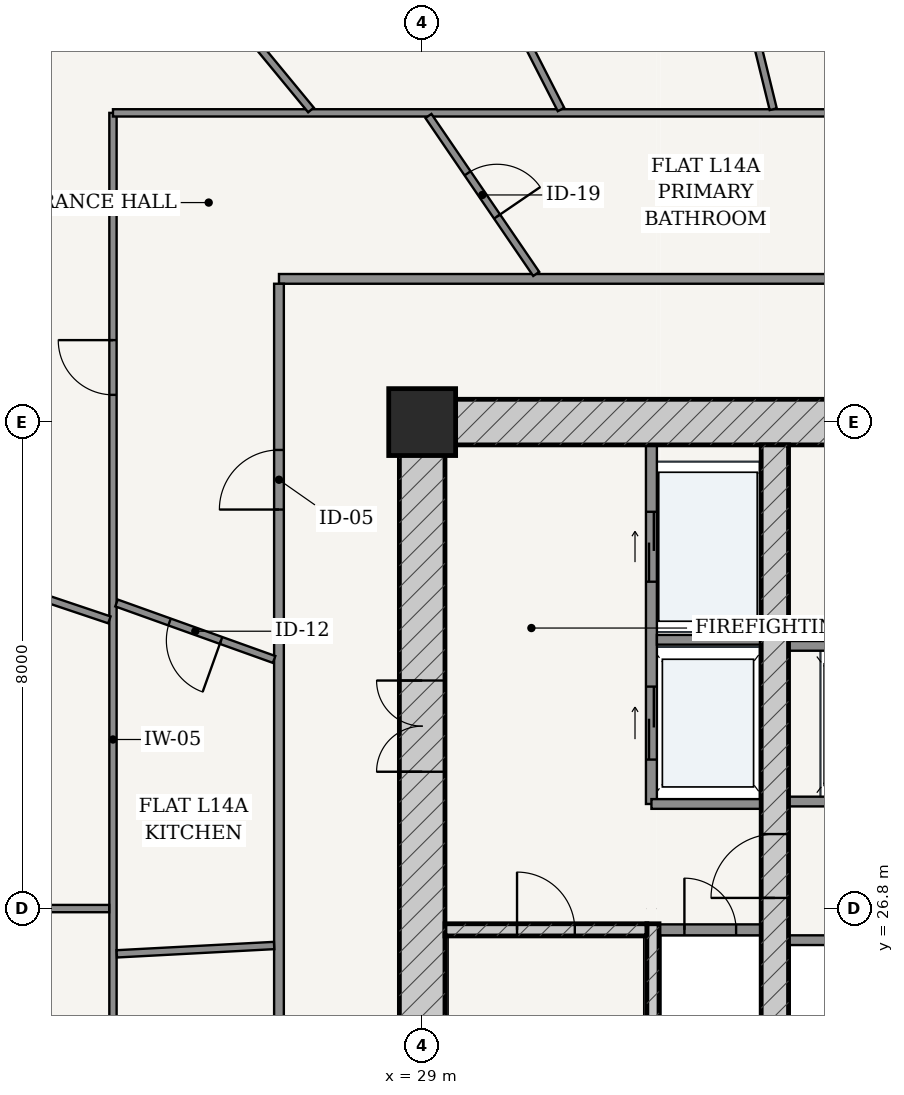
"""IFC4 building model, lengths in metres.
Left out: names, types, materials, properties, quantities, classifications, styles, units other than length and angle.
Written with IfcOpenShell. Run it as: python <this file> out.ifc"""

import sys

from ifc_helpers import new_model, si_unit, direction, frame, frame_2d, origin, origin_2d, place, context, subcontext, project, spatial, rectangle, extrude, source, transform, mapped, element, fill, save


model = new_model("IFC4")
c1 = context("Model", 3, precision=1e-05, world=origin(), true_north=direction((-0.2419218956, 0.970295726276)))
c2 = subcontext(c1, "Body", "Model", "MODEL_VIEW")
j1 = project(units=[si_unit("LENGTHUNIT", "METRE"), si_unit("PLANEANGLEUNIT", "RADIAN")], contexts=[c1])
p1 = place(None, origin())
s1 = spatial("IfcSite", under=j1, at=p1, CompositionType="ELEMENT")
p2 = place(p1, origin())
s2 = spatial("IfcBuilding", under=s1, at=p2, CompositionType="ELEMENT")
p3 = place(p2, frame((0.0, 0.0, 56.4)))
s3 = spatial("IfcBuildingStorey", under=s2, at=p3, CompositionType="ELEMENT", Elevation=56.4)
p4 = place(p3, frame((29.0, 34.8, 0.0), z_axis=(0.0, 0.0, 1.0), x_axis=(1.0, 0.0, 0.0)))
e1 = element("IfcColumn", 1, at=p4, inside=s3, PredefinedType="COLUMN", context=c2, shape_type="SweptSolid", body=[
    extrude(rectangle(XDim=1.1, YDim=1.1, at=origin_2d()), origin(), (0.0, 0.0, 1.0), 3.6),
])
p5 = place(p3, frame((28.625, 34.8, 0.0), z_axis=(0.0, 0.0, 1.0), x_axis=(1.0, 0.0, 0.0)))
e2 = element("IfcWall", 2, at=p5, inside=s3, PredefinedType="SHEAR", context=c2, shape_type="SweptSolid", body=[
    extrude(rectangle(XDim=18.75, YDim=0.75, at=frame_2d((9.375, 0.0))), origin(), (0.0, 0.0, 1.0), 3.32),
])
p6 = place(p5, frame((8.95, 0.0, 0.0)))
e3 = element("IfcOpeningElement", 3, at=p6, cuts=e2, PredefinedType="OPENING", context=c2, shape_type="SweptSolid", body=[
    extrude(rectangle(XDim=0.85, YDim=2.1, at=frame_2d((0.425, 1.05))), frame((0.0, 0.385, 0.0), z_axis=(0.0, -1.0, 0.0), x_axis=(1.0, 0.0, 0.0)), (0.0, 0.0, 1.0), 0.77),
])
p7 = place(p3, frame((29.0, 19.175, 0.0), z_axis=(0.0, 0.0, 1.0), x_axis=(0.0, 1.0, 0.0)))
e4 = element("IfcWall", 4, at=p7, inside=s3, PredefinedType="SHEAR", context=c2, shape_type="SweptSolid", body=[
    extrude(rectangle(XDim=15.25, YDim=0.75, at=frame_2d((7.625, 0.0))), origin(), (0.0, 0.0, 1.0), 3.32),
])
p8 = place(p7, frame((9.875, 0.0, 0.0)))
e5 = element("IfcOpeningElement", 5, at=p8, cuts=e4, PredefinedType="OPENING", context=c2, shape_type="SweptSolid", body=[
    extrude(rectangle(XDim=1.5, YDim=2.2, at=frame_2d((0.75, 1.1))), frame((0.0, 0.385, 0.0), z_axis=(0.0, -1.0, 0.0), x_axis=(1.0, 0.0, 0.0)), (0.0, 0.0, 1.0), 0.77),
])
p9 = place(p3, frame((32.795, 19.175, 0.0), z_axis=(0.0, 0.0, 1.0), x_axis=(0.0, 1.0, 0.0)))
e6 = element("IfcWall", 6, at=p9, inside=s3, PredefinedType="SOLIDWALL", context=c2, shape_type="SweptSolid", body=[
    extrude(rectangle(XDim=7.375, YDim=0.2, at=frame_2d((3.688, 0.0))), origin(), (0.0, 0.0, 1.0), 3.32),
])
p10 = place(p3, frame((29.375, 26.45, 0.0), z_axis=(0.0, 0.0, 1.0), x_axis=(1.0, 0.0, 0.0)))
e7 = element("IfcWall", 7, at=p10, inside=s3, PredefinedType="SOLIDWALL", context=c2, shape_type="SweptSolid", body=[
    extrude(rectangle(XDim=3.32, YDim=0.2, at=frame_2d((1.66, 0.0))), origin(), (0.0, 0.0, 1.0), 3.32),
])
p11 = place(p10, frame((1.185, 0.0, 0.0)))
e8 = element("IfcOpeningElement", 8, at=p11, cuts=e7, PredefinedType="OPENING", context=c2, shape_type="SweptSolid", body=[
    extrude(rectangle(XDim=0.95, YDim=2.15, at=frame_2d((0.475, 1.075))), frame((0.0, 0.11, 0.0), z_axis=(0.0, -1.0, 0.0), x_axis=(1.0, 0.0, 0.0)), (0.0, 0.0, 1.0), 0.22),
])
p12 = place(p3, frame((34.8, 19.175, 0.0), z_axis=(0.0, 0.0, 1.0), x_axis=(0.0, 1.0, 0.0)))
e9 = element("IfcWall", 9, at=p12, inside=s3, PredefinedType="SHEAR", context=c2, shape_type="SweptSolid", body=[
    extrude(rectangle(XDim=15.25, YDim=0.45, at=frame_2d((7.625, 0.0))), origin(), (0.0, 0.0, 1.0), 3.32),
])
p13 = place(p12, frame((7.8, 0.0, 0.0)))
e10 = element("IfcOpeningElement", 10, at=p13, cuts=e9, PredefinedType="OPENING", context=c2, shape_type="SweptSolid", body=[
    extrude(rectangle(XDim=1.05, YDim=2.15, at=frame_2d((0.525, 1.075))), frame((0.0, 0.235, 0.0), z_axis=(0.0, -1.0, 0.0), x_axis=(1.0, 0.0, 0.0)), (0.0, 0.0, 1.0), 0.47),
])
p14 = place(p3, frame((32.9, 26.45, 0.0), z_axis=(0.0, 0.0, 1.0), x_axis=(1.0, 0.0, 0.0)))
e11 = element("IfcWall", 11, at=p14, inside=s3, PredefinedType="PARTITIONING", context=c2, shape_type="SweptSolid", body=[
    extrude(rectangle(XDim=1.675, YDim=0.18, at=frame_2d((0.837, 0.0))), origin(), (0.0, 0.0, 1.0), 3.32),
])
p15 = place(p14, frame((0.413, 0.0, 0.0)))
e12 = element("IfcOpeningElement", 12, at=p15, cuts=e11, PredefinedType="OPENING", context=c2, shape_type="SweptSolid", body=[
    extrude(rectangle(XDim=0.85, YDim=2.1, at=frame_2d((0.425, 1.05))), frame((0.0, 0.1, 0.0), z_axis=(0.0, -1.0, 0.0), x_axis=(1.0, 0.0, 0.0)), (0.0, 0.0, 1.0), 0.2),
])
p16 = place(p3, frame((32.77, 28.52, 0.0), z_axis=(0.0, 0.0, 1.0), x_axis=(0.0, 1.0, 0.0)))
e13 = element("IfcWall", 13, at=p16, inside=s3, PredefinedType="PARTITIONING", context=c2, shape_type="SweptSolid", body=[
    extrude(rectangle(XDim=5.905, YDim=0.18, at=frame_2d((2.953, 0.0))), origin(), (0.0, 0.0, 1.0), 3.32),
])
p17 = place(p16, frame((3.655, 0.0, 0.0)))
e14 = element("IfcOpeningElement", 14, at=p17, cuts=e13, PredefinedType="OPENING", context=c2, shape_type="SweptSolid", body=[
    extrude(rectangle(XDim=1.15, YDim=2.2, at=frame_2d((0.575, 1.1))), frame((0.0, 0.1, 0.0), z_axis=(0.0, -1.0, 0.0), x_axis=(1.0, 0.0, 0.0)), (0.0, 0.0, 1.0), 0.2),
])
p18 = place(p16, frame((0.73, 0.0, 0.0)))
e15 = element("IfcOpeningElement", 15, at=p18, cuts=e13, PredefinedType="OPENING", context=c2, shape_type="SweptSolid", body=[
    extrude(rectangle(XDim=1.2, YDim=2.25, at=frame_2d((0.6, 1.125))), frame((0.0, 0.1, 0.0), z_axis=(0.0, -1.0, 0.0), x_axis=(1.0, 0.0, 0.0)), (0.0, 0.0, 1.0), 0.2),
])
p19 = place(p3, frame((32.86, 31.22, 0.0), z_axis=(0.0, 0.0, 1.0), x_axis=(1.0, 0.0, 0.0)))
e16 = element("IfcWall", 16, at=p19, inside=s3, PredefinedType="PARTITIONING", context=c2, shape_type="SweptSolid", body=[
    extrude(rectangle(XDim=1.715, YDim=0.16, at=frame_2d((0.857, 0.0))), origin(), (0.0, 0.0, 1.0), 3.32),
])
p20 = place(p3, frame((32.77, 28.52, 0.0), z_axis=(0.0, 0.0, 1.0), x_axis=(1.0, 0.0, 0.0)))
e17 = element("IfcWall", 17, at=p20, inside=s3, PredefinedType="PARTITIONING", context=c2, shape_type="SweptSolid", body=[
    extrude(rectangle(XDim=1.805, YDim=0.16, at=frame_2d((0.902, 0.0))), origin(), (0.0, 0.0, 1.0), 3.32),
])
p21 = place(p3, frame((35.025, 28.56, 0.0), z_axis=(0.0, 0.0, 1.0), x_axis=(1.0, 0.0, 0.0)))
e18 = element("IfcWall", 18, at=p21, inside=s3, PredefinedType="PARTITIONING", context=c2, shape_type="SweptSolid", body=[
    extrude(rectangle(XDim=5.95, YDim=0.16, at=frame_2d((2.975, 0.0))), origin(), (0.0, 0.0, 1.0), 3.32),
])
p22 = place(p21, frame((0.76, 0.0, 0.0)))
e19 = element("IfcOpeningElement", 19, at=p22, cuts=e18, PredefinedType="OPENING", context=c2, shape_type="SweptSolid", body=[
    extrude(rectangle(XDim=1.1, YDim=2.2, at=frame_2d((0.55, 1.1))), frame((0.0, 0.09, 0.0), z_axis=(0.0, -1.0, 0.0), x_axis=(1.0, 0.0, 0.0)), (0.0, 0.0, 1.0), 0.18),
])
p23 = place(p21, frame((2.425, 0.0, 0.0)))
e20 = element("IfcOpeningElement", 20, at=p23, cuts=e18, PredefinedType="OPENING", context=c2, shape_type="SweptSolid", body=[
    extrude(rectangle(XDim=1.1, YDim=2.2, at=frame_2d((0.55, 1.1))), frame((0.0, 0.09, 0.0), z_axis=(0.0, -1.0, 0.0), x_axis=(1.0, 0.0, 0.0)), (0.0, 0.0, 1.0), 0.18),
])
p24 = place(p21, frame((4.09, 0.0, 0.0)))
e21 = element("IfcOpeningElement", 21, at=p24, cuts=e18, PredefinedType="OPENING", context=c2, shape_type="SweptSolid", body=[
    extrude(rectangle(XDim=1.1, YDim=2.2, at=frame_2d((0.55, 1.1))), frame((0.0, 0.09, 0.0), z_axis=(0.0, -1.0, 0.0), x_axis=(1.0, 0.0, 0.0)), (0.0, 0.0, 1.0), 0.18),
])
for number, where, z_axis, x_axis in (
    (22, (35.025, 31.12, 0.0), (0.0, 0.0, 1.0), (1.0, 0.0, 0.0)),
    (23, (35.025, 26.28, 0.0), (0.0, 0.0, 1.0), (1.0, 0.0, 0.0)),
):
    element("IfcWall", number, at=place(p3, frame(where, z_axis=z_axis, x_axis=x_axis)), inside=s3, PredefinedType="PARTITIONING", context=c2, shape_type="SweptSolid", body=[
        extrude(rectangle(XDim=5.95, YDim=0.16, at=frame_2d((2.975, 0.0))), origin(), (0.0, 0.0, 1.0), 3.32),
    ])
p25 = place(p3, frame((26.645, 37.155, 0.0), z_axis=(0.0, 0.0, 1.0), x_axis=(1.0, 0.0, 0.0)))
e24 = element("IfcWall", 24, at=p25, inside=s3, PredefinedType="PARTITIONING", context=c2, shape_type="SweptSolid", body=[
    extrude(rectangle(XDim=22.71, YDim=0.16, at=frame_2d((11.355, 0.0))), origin(), (0.0, 0.0, 1.0), 2.688),
])
p26 = place(p3, frame((26.645, 16.525, 0.0), z_axis=(0.0, 0.0, 1.0), x_axis=(0.0, 1.0, 0.0)))
e25 = element("IfcWall", 25, at=p26, inside=s3, PredefinedType="PARTITIONING", context=c2, shape_type="SweptSolid", body=[
    extrude(rectangle(XDim=20.55, YDim=0.16, at=frame_2d((10.275, 0.0))), origin(), (0.0, 0.0, 1.0), 2.688),
])
p27 = place(p26, frame((16.837, 0.0, 0.0)))
e26 = element("IfcOpeningElement", 26, at=p27, cuts=e25, PredefinedType="OPENING", context=c2, shape_type="SweptSolid", body=[
    extrude(rectangle(XDim=0.98, YDim=2.2, at=frame_2d((0.49, 1.1))), frame((0.0, 0.09, 0.0), z_axis=(0.0, -1.0, 0.0), x_axis=(1.0, 0.0, 0.0)), (0.0, 0.0, 1.0), 0.18),
])
p28 = place(p3, frame((23.915, 19.276, 0.0), z_axis=(0.0, 0.0, 1.0), x_axis=(0.0, 1.0, 0.0)))
e27 = element("IfcWall", 27, at=p28, inside=s3, PredefinedType="PARTITIONING", context=c2, shape_type="SweptSolid", body=[
    extrude(rectangle(XDim=20.609, YDim=0.12, at=frame_2d((10.305, 0.0))), origin(), (0.0, 0.0, 1.0), 2.688),
])
p29 = place(p28, frame((15.972, 0.0, 0.0)))
e28 = element("IfcOpeningElement", 28, at=p29, cuts=e27, PredefinedType="OPENING", context=c2, shape_type="SweptSolid", body=[
    extrude(rectangle(XDim=0.9, YDim=2.15, at=frame_2d((0.45, 1.075))), frame((0.0, 0.07, 0.0), z_axis=(0.0, -1.0, 0.0), x_axis=(1.0, 0.0, 0.0)), (0.0, 0.0, 1.0), 0.14),
])
p30 = place(p28, frame((3.058, 0.0, 0.0)))
e29 = element("IfcOpeningElement", 29, at=p30, cuts=e27, PredefinedType="OPENING", context=c2, shape_type="SweptSolid", body=[
    extrude(rectangle(XDim=0.9, YDim=2.15, at=frame_2d((0.45, 1.075))), frame((0.0, 0.07, 0.0), z_axis=(0.0, -1.0, 0.0), x_axis=(1.0, 0.0, 0.0)), (0.0, 0.0, 1.0), 0.14),
])
p31 = place(p3, frame((23.915, 39.885, 0.0), z_axis=(0.0, 0.0, 1.0), x_axis=(1.0, 0.0, 0.0)))
e30 = element("IfcWall", 30, at=p31, inside=s3, PredefinedType="PARTITIONING", context=c2, shape_type="SweptSolid", body=[
    extrude(rectangle(XDim=28.17, YDim=0.12, at=frame_2d((14.085, 0.0))), origin(), (0.0, 0.0, 1.0), 2.688),
])
p32 = place(p31, frame((12.891, 0.0, 0.0)))
e31 = element("IfcOpeningElement", 31, at=p32, cuts=e30, PredefinedType="OPENING", context=c2, shape_type="SweptSolid", body=[
    extrude(rectangle(XDim=0.9, YDim=2.15, at=frame_2d((0.45, 1.075))), frame((0.0, 0.07, 0.0), z_axis=(0.0, -1.0, 0.0), x_axis=(1.0, 0.0, 0.0)), (0.0, 0.0, 1.0), 0.14),
])
p33 = place(p3, frame((34.773, 39.945, 0.0), z_axis=(0.0, 0.0, 1.0), x_axis=(-0.238375747469, 0.97117300365, 0.0)))
e32 = element("IfcWall", 32, at=p33, inside=s3, PredefinedType="PARTITIONING", context=c2, shape_type="SweptSolid", body=[
    extrude(rectangle(XDim=10.086, YDim=0.12, at=frame_2d((5.043, 0.0))), origin(), (0.0, 0.0, 1.0), 2.688),
])
p34 = place(p33, frame((3.519, 0.0, 0.0)))
e33 = element("IfcOpeningElement", 33, at=p34, cuts=e32, PredefinedType="OPENING", context=c2, shape_type="SweptSolid", body=[
    extrude(rectangle(XDim=0.9, YDim=2.15, at=frame_2d((0.45, 1.075))), frame((0.0, 0.07, 0.0), z_axis=(0.0, -1.0, 0.0), x_axis=(1.0, 0.0, 0.0)), (0.0, 0.0, 1.0), 0.14),
])
p35 = place(p3, frame((31.283, 39.94, 0.0), z_axis=(0.0, 0.0, 1.0), x_axis=(-0.455131303234, 0.890424335256, 0.0)))
e34 = element("IfcWall", 34, at=p35, inside=s3, PredefinedType="PARTITIONING", context=c2, shape_type="SweptSolid", body=[
    extrude(rectangle(XDim=9.562, YDim=0.12, at=frame_2d((4.781, 0.0))), origin(), (0.0, 0.0, 1.0), 2.762),
])
p36 = place(p35, frame((4.331, 0.0, 0.0)))
e35 = element("IfcOpeningElement", 35, at=p36, cuts=e34, PredefinedType="OPENING", context=c2, shape_type="SweptSolid", body=[
    extrude(rectangle(XDim=0.9, YDim=2.15, at=frame_2d((0.45, 1.075))), frame((0.0, 0.07, 0.0), z_axis=(0.0, -1.0, 0.0), x_axis=(1.0, 0.0, 0.0)), (0.0, 0.0, 1.0), 0.14),
])
p37 = place(p3, frame((27.171, 39.933, 0.0), z_axis=(0.0, 0.0, 1.0), x_axis=(-0.636192172227, 0.771530634516, 0.0)))
e36 = element("IfcWall", 36, at=p37, inside=s3, PredefinedType="PARTITIONING", context=c2, shape_type="SweptSolid", body=[
    extrude(rectangle(XDim=8.186, YDim=0.12, at=frame_2d((4.093, 0.0))), origin(), (0.0, 0.0, 1.0), 2.688),
])
p38 = place(p37, frame((2.584, 0.0, 0.0)))
e37 = element("IfcOpeningElement", 37, at=p38, cuts=e36, PredefinedType="OPENING", context=c2, shape_type="SweptSolid", body=[
    extrude(rectangle(XDim=0.9, YDim=2.15, at=frame_2d((0.45, 1.075))), frame((0.0, 0.07, 0.0), z_axis=(0.0, -1.0, 0.0), x_axis=(1.0, 0.0, 0.0)), (0.0, 0.0, 1.0), 0.14),
])
p39 = place(p3, frame((23.856, 31.547, 0.0), z_axis=(0.0, 0.0, 1.0), x_axis=(-0.948017487737, 0.318218231634, 0.0)))
e38 = element("IfcWall", 38, at=p39, inside=s3, PredefinedType="PARTITIONING", context=c2, shape_type="SweptSolid", body=[
    extrude(rectangle(XDim=13.279, YDim=0.12, at=frame_2d((6.639, 0.0))), origin(), (0.0, 0.0, 1.0), 2.762),
])
p40 = place(p39, frame((6.189, 0.0, 0.0)))
e39 = element("IfcOpeningElement", 39, at=p40, cuts=e38, PredefinedType="OPENING", context=c2, shape_type="SweptSolid", body=[
    extrude(rectangle(XDim=0.9, YDim=2.15, at=frame_2d((0.45, 1.075))), frame((0.0, 0.07, 0.0), z_axis=(0.0, -1.0, 0.0), x_axis=(1.0, 0.0, 0.0)), (0.0, 0.0, 1.0), 0.14),
])
p41 = place(p3, frame((23.853, 26.8, 0.0), z_axis=(0.0, 0.0, 1.0), x_axis=(-1.0, 0.0, 0.0)))
e40 = element("IfcWall", 40, at=p41, inside=s3, PredefinedType="PARTITIONING", context=c2, shape_type="SweptSolid", body=[
    extrude(rectangle(XDim=14.793, YDim=0.12, at=frame_2d((7.396, 0.0))), origin(), (0.0, 0.0, 1.0), 2.762),
])
p42 = place(p41, frame((6.947, 0.0, 0.0)))
e41 = element("IfcOpeningElement", 41, at=p42, cuts=e40, PredefinedType="OPENING", context=c2, shape_type="SweptSolid", body=[
    extrude(rectangle(XDim=0.9, YDim=2.15, at=frame_2d((0.45, 1.075))), frame((0.0, 0.07, 0.0), z_axis=(0.0, -1.0, 0.0), x_axis=(1.0, 0.0, 0.0)), (0.0, 0.0, 1.0), 0.14),
])
p43 = place(p3, frame((30.875, 37.237, 0.0), z_axis=(0.0, 0.0, 1.0), x_axis=(-0.563751131022, 0.825944708967, 0.0)))
e42 = element("IfcWall", 42, at=p43, inside=s3, PredefinedType="PARTITIONING", context=c2, shape_type="SweptSolid", body=[
    extrude(rectangle(XDim=3.145, YDim=0.12, at=frame_2d((1.572, 0.0))), origin(), (0.0, 0.0, 1.0), 3.32),
])
p44 = place(p43, frame((1.142, 0.0, 0.0)))
e43 = element("IfcOpeningElement", 43, at=p44, cuts=e42, PredefinedType="OPENING", context=c2, shape_type="SweptSolid", body=[
    extrude(rectangle(XDim=0.86, YDim=2.15, at=frame_2d((0.43, 1.075))), frame((0.0, 0.07, 0.0), z_axis=(0.0, -1.0, 0.0), x_axis=(1.0, 0.0, 0.0)), (0.0, 0.0, 1.0), 0.14),
])
p45 = place(p3, frame((26.565, 30.896, 0.0), z_axis=(0.0, 0.0, 1.0), x_axis=(-0.941406362049, 0.337274460186, 0.0)))
e44 = element("IfcWall", 44, at=p45, inside=s3, PredefinedType="PARTITIONING", context=c2, shape_type="SweptSolid", body=[
    extrude(rectangle(XDim=2.753, YDim=0.12, at=frame_2d((1.376, 0.0))), origin(), (0.0, 0.0, 1.0), 3.32),
])
p46 = place(p45, frame((0.927, 0.0, 0.0)))
e45 = element("IfcOpeningElement", 45, at=p46, cuts=e44, PredefinedType="OPENING", context=c2, shape_type="SweptSolid", body=[
    extrude(rectangle(XDim=0.9, YDim=2.15, at=frame_2d((0.45, 1.075))), frame((0.0, 0.07, 0.0), z_axis=(0.0, -1.0, 0.0), x_axis=(1.0, 0.0, 0.0)), (0.0, 0.0, 1.0), 0.14),
])
p47 = place(p3, frame((26.565, 26.193, 0.0), z_axis=(0.0, 0.0, 1.0), x_axis=(-0.99859273586, -0.053033460078, 0.0)))
e46 = element("IfcWall", 46, at=p47, inside=s3, PredefinedType="PARTITIONING", context=c2, shape_type="SweptSolid", body=[
    extrude(rectangle(XDim=2.592, YDim=0.12, at=frame_2d((1.296, 0.0))), origin(), (0.0, 0.0, 1.0), 3.32),
])
m1 = source(origin(), c2, "Body", "SweptSolid", [
    extrude(rectangle(XDim=1.5, YDim=2.2, at=frame_2d((0.75, 1.1))), frame((0.0, 0.025, 0.0), z_axis=(0.0, -1.0, 0.0), x_axis=(1.0, 0.0, 0.0)), (0.0, 0.0, 1.0), 0.05),
])
p48 = place(p8, origin())
e47 = element("IfcDoor", 47, at=p48, inside=s3, OperationType="DOUBLE_DOOR_SINGLE_SWING", PredefinedType="DOOR", context=c2, shape_type="MappedRepresentation", body=[
    mapped(m1, transform((0.0, 0.0, 0.0), scale=1.0)),
])
fill(e5, e47)
m2 = source(origin(), c2, "Body", "SweptSolid", [
    extrude(rectangle(XDim=1.05, YDim=2.15, at=frame_2d((0.525, 1.075))), frame((0.0, 0.025, 0.0), z_axis=(0.0, -1.0, 0.0), x_axis=(1.0, 0.0, 0.0)), (0.0, 0.0, 1.0), 0.05),
])
p49 = place(p13, origin())
e48 = element("IfcDoor", 48, at=p49, inside=s3, OperationType="SINGLE_SWING_LEFT", PredefinedType="DOOR", context=c2, shape_type="MappedRepresentation", body=[
    mapped(m2, transform((0.0, 0.0, 0.0), scale=1.0)),
])
fill(e10, e48)
m3 = source(origin(), c2, "Body", "SweptSolid", [
    extrude(rectangle(XDim=0.95, YDim=2.15, at=frame_2d((0.475, 1.075))), frame((0.0, 0.025, 0.0), z_axis=(0.0, -1.0, 0.0), x_axis=(1.0, 0.0, 0.0)), (0.0, 0.0, 1.0), 0.05),
])
p50 = place(p11, origin())
e49 = element("IfcDoor", 49, at=p50, inside=s3, OperationType="SINGLE_SWING_LEFT", PredefinedType="DOOR", context=c2, shape_type="MappedRepresentation", body=[
    mapped(m3, transform((0.0, 0.0, 0.0), scale=1.0)),
])
fill(e8, e49)
m4 = source(origin(), c2, "Body", "SweptSolid", [
    extrude(rectangle(XDim=0.85, YDim=2.1, at=frame_2d((0.425, 1.05))), frame((0.0, 0.025, 0.0), z_axis=(0.0, -1.0, 0.0), x_axis=(1.0, 0.0, 0.0)), (0.0, 0.0, 1.0), 0.05),
])
p51 = place(p15, origin())
e50 = element("IfcDoor", 50, at=p51, inside=s3, OperationType="SINGLE_SWING_LEFT", PredefinedType="DOOR", context=c2, shape_type="MappedRepresentation", body=[
    mapped(m4, transform((0.0, 0.0, 0.0), scale=1.0)),
])
fill(e12, e50)
m5 = source(origin(), c2, "Body", "SweptSolid", [
    extrude(rectangle(XDim=1.15, YDim=2.2, at=frame_2d((0.575, 1.1))), frame((0.0, 0.025, 0.0), z_axis=(0.0, -1.0, 0.0), x_axis=(1.0, 0.0, 0.0)), (0.0, 0.0, 1.0), 0.05),
])
p52 = place(p17, origin())
e51 = element("IfcDoor", 51, at=p52, inside=s3, OperationType="DOUBLE_DOOR_SLIDING", PredefinedType="DOOR", context=c2, shape_type="MappedRepresentation", body=[
    mapped(m5, transform((0.0, 0.0, 0.0), scale=1.0)),
])
fill(e14, e51)
m6 = source(origin(), c2, "Body", "SweptSolid", [
    extrude(rectangle(XDim=1.2, YDim=2.25, at=frame_2d((0.6, 1.125))), frame((0.0, 0.025, 0.0), z_axis=(0.0, -1.0, 0.0), x_axis=(1.0, 0.0, 0.0)), (0.0, 0.0, 1.0), 0.05),
])
p53 = place(p18, origin())
e52 = element("IfcDoor", 52, at=p53, inside=s3, OperationType="DOUBLE_DOOR_SLIDING", PredefinedType="DOOR", context=c2, shape_type="MappedRepresentation", body=[
    mapped(m6, transform((0.0, 0.0, 0.0), scale=1.0)),
])
fill(e15, e52)
m7 = source(origin(), c2, "Body", "SweptSolid", [
    extrude(rectangle(XDim=0.98, YDim=2.2, at=frame_2d((0.49, 1.1))), frame((0.0, 0.025, 0.0), z_axis=(0.0, -1.0, 0.0), x_axis=(1.0, 0.0, 0.0)), (0.0, 0.0, 1.0), 0.05),
])
p54 = place(p27, origin())
e53 = element("IfcDoor", 53, at=p54, inside=s3, OperationType="SINGLE_SWING_LEFT", PredefinedType="DOOR", context=c2, shape_type="MappedRepresentation", body=[
    mapped(m7, transform((0.0, 0.0, 0.0), scale=1.0)),
])
fill(e26, e53)
m8 = source(origin(), c2, "Body", "SweptSolid", [
    extrude(rectangle(XDim=0.86, YDim=2.15, at=frame_2d((0.43, 1.075))), frame((0.0, 0.025, 0.0), z_axis=(0.0, -1.0, 0.0), x_axis=(1.0, 0.0, 0.0)), (0.0, 0.0, 1.0), 0.05),
])
p55 = place(p44, frame((0.86, 0.0, 0.0), z_axis=(0.0, 0.0, 1.0), x_axis=(-1.0, 0.0, 0.0)))
e54 = element("IfcDoor", 54, at=p55, inside=s3, OperationType="SINGLE_SWING_RIGHT", PredefinedType="DOOR", context=c2, shape_type="MappedRepresentation", body=[
    mapped(m8, transform((0.0, 0.0, 0.0), scale=1.0)),
])
fill(e43, e54)
m9 = source(origin(), c2, "Body", "SweptSolid", [
    extrude(rectangle(XDim=0.9, YDim=2.15, at=frame_2d((0.45, 1.075))), frame((0.0, 0.025, 0.0), z_axis=(0.0, -1.0, 0.0), x_axis=(1.0, 0.0, 0.0)), (0.0, 0.0, 1.0), 0.05),
])
p56 = place(p46, origin())
e55 = element("IfcDoor", 55, at=p56, inside=s3, OperationType="SINGLE_SWING_LEFT", PredefinedType="DOOR", context=c2, shape_type="MappedRepresentation", body=[
    mapped(m9, transform((0.0, 0.0, 0.0), scale=1.0)),
])
fill(e45, e55)
p57 = place(p29, origin())
e56 = element("IfcDoor", 56, at=p57, inside=s3, OperationType="SINGLE_SWING_RIGHT", PredefinedType="DOOR", context=c2, shape_type="MappedRepresentation", body=[
    mapped(m9, transform((0.0, 0.0, 0.0), scale=1.0)),
])
fill(e28, e56)
save(model, sys.argv[1])
